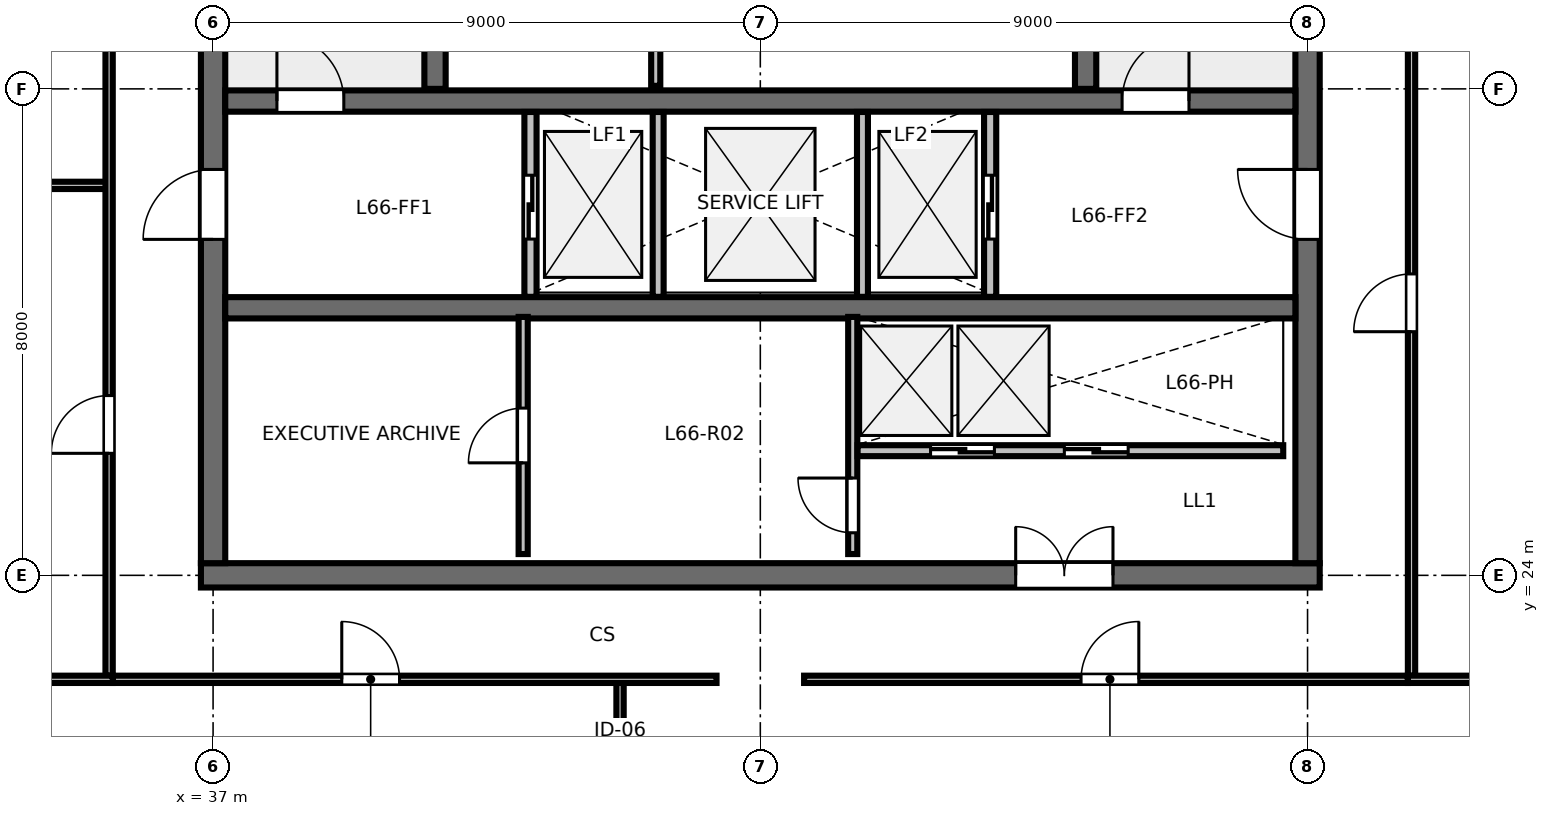
"""IFC4 building model, lengths in metres.
Left out: names, types, materials, properties, quantities, classifications, styles, units other than length and angle.
Written with IfcOpenShell. Run it as: python <this file> out.ifc"""

import sys

from ifc_helpers import new_model, si_unit, direction, frame, frame_2d, origin, place, context, subcontext, project, spatial, rectangle, extrude, element, fill, save


model = new_model("IFC4")
c1 = context("Model", 3, precision=1e-05, world=origin(), true_north=direction((0.0, 1.0)))
c2 = subcontext(c1, "Body", "Model", "MODEL_VIEW")
j1 = project(units=[si_unit("LENGTHUNIT", "METRE"), si_unit("PLANEANGLEUNIT", "RADIAN")], contexts=[c1])
p1 = place(None, origin())
s1 = spatial("IfcSite", under=j1, at=p1, CompositionType="ELEMENT")
p2 = place(p1, origin())
s2 = spatial("IfcBuilding", under=s1, at=p2, CompositionType="ELEMENT")
p3 = place(p2, frame((0.0, 0.0, 250.2)))
s3 = spatial("IfcBuildingStorey", under=s2, at=p3, CompositionType="ELEMENT", Elevation=250.2)
p4 = place(p3, frame((36.8, 24.0, 0.0), z_axis=(0.0, 0.0, 1.0), x_axis=(1.0, 0.0, 0.0)))
e1 = element("IfcWall", 1, at=p4, inside=s3, PredefinedType="SHEAR", context=c2, shape_type="SweptSolid", body=[
    extrude(rectangle(XDim=18.4, YDim=0.4, at=frame_2d((9.2, 0.0))), origin(), (0.0, 0.0, 1.0), 3.36),
])
p5 = place(p4, frame((13.4, 0.0, 0.0)))
e2 = element("IfcOpeningElement", 2, at=p5, cuts=e1, PredefinedType="OPENING", context=c2, shape_type="SweptSolid", body=[
    extrude(rectangle(XDim=1.6, YDim=2.15, at=frame_2d((0.8, 1.075))), frame((0.0, 0.21, 0.0), z_axis=(0.0, -1.0, 0.0), x_axis=(1.0, 0.0, 0.0)), (0.0, 0.0, 1.0), 0.42),
])
p6 = place(p3, frame((37.0, 24.2, 0.0), z_axis=(0.0, 0.0, 1.0), x_axis=(0.0, 1.0, 0.0)))
e3 = element("IfcWall", 3, at=p6, inside=s3, PredefinedType="SHEAR", context=c2, shape_type="SweptSolid", body=[
    extrude(rectangle(XDim=15.6, YDim=0.4, at=frame_2d((7.8, 0.0))), origin(), (0.0, 0.0, 1.0), 3.36),
])
p7 = place(p6, frame((5.325, 0.0, 0.0)))
e4 = element("IfcOpeningElement", 4, at=p7, cuts=e3, PredefinedType="OPENING", context=c2, shape_type="SweptSolid", body=[
    extrude(rectangle(XDim=1.15, YDim=2.15, at=frame_2d((0.575, 1.075))), frame((0.0, 0.21, 0.0), z_axis=(0.0, -1.0, 0.0), x_axis=(1.0, 0.0, 0.0)), (0.0, 0.0, 1.0), 0.42),
])
p8 = place(p3, frame((55.0, 24.2, 0.0), z_axis=(0.0, 0.0, 1.0), x_axis=(0.0, 1.0, 0.0)))
e5 = element("IfcWall", 5, at=p8, inside=s3, PredefinedType="SHEAR", context=c2, shape_type="SweptSolid", body=[
    extrude(rectangle(XDim=15.6, YDim=0.4, at=frame_2d((7.8, 0.0))), origin(), (0.0, 0.0, 1.0), 3.36),
])
p9 = place(p8, frame((5.325, 0.0, 0.0)))
e6 = element("IfcOpeningElement", 6, at=p9, cuts=e5, PredefinedType="OPENING", context=c2, shape_type="SweptSolid", body=[
    extrude(rectangle(XDim=1.15, YDim=2.15, at=frame_2d((0.575, 1.075))), frame((0.0, 0.21, 0.0), z_axis=(0.0, -1.0, 0.0), x_axis=(1.0, 0.0, 0.0)), (0.0, 0.0, 1.0), 0.42),
])
p10 = place(p3, frame((37.2, 31.8, 0.0), z_axis=(0.0, 0.0, 1.0), x_axis=(1.0, 0.0, 0.0)))
e7 = element("IfcWall", 7, at=p10, inside=s3, PredefinedType="SHEAR", context=c2, shape_type="SweptSolid", body=[
    extrude(rectangle(XDim=17.6, YDim=0.35, at=frame_2d((8.8, 0.0))), origin(), (0.0, 0.0, 1.0), 3.36),
])
p11 = place(p10, frame((0.85, 0.0, 0.0)))
e8 = element("IfcOpeningElement", 8, at=p11, cuts=e7, PredefinedType="OPENING", context=c2, shape_type="SweptSolid", body=[
    extrude(rectangle(XDim=1.1, YDim=2.15, at=frame_2d((0.55, 1.075))), frame((0.0, 0.185, 0.0), z_axis=(0.0, -1.0, 0.0), x_axis=(1.0, 0.0, 0.0)), (0.0, 0.0, 1.0), 0.37),
])
p12 = place(p10, frame((14.75, 0.0, 0.0)))
e9 = element("IfcOpeningElement", 9, at=p12, cuts=e7, PredefinedType="OPENING", context=c2, shape_type="SweptSolid", body=[
    extrude(rectangle(XDim=1.1, YDim=2.15, at=frame_2d((0.55, 1.075))), frame((0.0, 0.185, 0.0), z_axis=(0.0, -1.0, 0.0), x_axis=(1.0, 0.0, 0.0)), (0.0, 0.0, 1.0), 0.37),
])
p13 = place(p3, frame((37.2, 28.4, 0.0), z_axis=(0.0, 0.0, 1.0), x_axis=(1.0, 0.0, 0.0)))
e10 = element("IfcWall", 10, at=p13, inside=s3, PredefinedType="SHEAR", context=c2, shape_type="SweptSolid", body=[
    extrude(rectangle(XDim=17.6, YDim=0.35, at=frame_2d((8.8, 0.0))), origin(), (0.0, 0.0, 1.0), 3.36),
])
for number, where, z_axis, x_axis in (
    (11, (57.193, 14.731, 0.0), (0.0, 0.0, 1.0), (0.707, 0.707, 0.0)),
    (12, (27.159, 22.38, 0.0), (0.0, 0.0, 1.0), (0.707, -0.707, 0.0)),
):
    element("IfcWall", number, at=place(p3, frame(where, z_axis=z_axis, x_axis=x_axis)), inside=s3, PredefinedType="STANDARD", context=c2, shape_type="SweptSolid", body=[
        extrude(rectangle(XDim=10.816, YDim=0.265, at=frame_2d((5.408, 0.0))), origin(), (0.0, 0.0, 1.0), 2.832),
    ])
for number, where, z_axis, x_axis in (
    (13, (40.65, 32.0, 0.0), (0.0, 0.0, 1.0), (0.0, 1.0, 0.0)),
    (14, (51.35, 32.0, 0.0), (0.0, 0.0, 1.0), (0.0, 1.0, 0.0)),
):
    element("IfcWall", number, at=place(p3, frame(where, z_axis=z_axis, x_axis=x_axis)), inside=s3, PredefinedType="SHEAR", context=c2, shape_type="SweptSolid", body=[
        extrude(rectangle(XDim=7.7, YDim=0.35, at=frame_2d((3.85, 0.0))), origin(), (0.0, 0.0, 1.0), 3.6),
    ])
p14 = place(p3, frame((44.28, 32.05, 0.0), z_axis=(0.0, 0.0, 1.0), x_axis=(0.0, 1.0, 0.0)))
e15 = element("IfcWall", 15, at=p14, inside=s3, PredefinedType="PARTITIONING", context=c2, shape_type="SweptSolid", body=[
    extrude(rectangle(XDim=3.67, YDim=0.15, at=frame_2d((1.835, 0.0))), origin(), (0.0, 0.0, 1.0), 3.375),
])
p15 = place(p14, frame((1.35, 0.0, 0.0)))
e16 = element("IfcOpeningElement", 16, at=p15, cuts=e15, PredefinedType="OPENING", context=c2, shape_type="SweptSolid", body=[
    extrude(rectangle(XDim=0.92, YDim=2.15, at=frame_2d((0.46, 1.075))), frame((0.0, 0.085, 0.0), z_axis=(0.0, -1.0, 0.0), x_axis=(1.0, 0.0, 0.0)), (0.0, 0.0, 1.0), 0.17),
])
p16 = place(p3, frame((42.22, 28.58, 0.0), z_axis=(0.0, 0.0, 1.0), x_axis=(0.0, 1.0, 0.0)))
e17 = element("IfcWall", 17, at=p16, inside=s3, PredefinedType="PARTITIONING", context=c2, shape_type="SweptSolid", body=[
    extrude(rectangle(XDim=3.04, YDim=0.2, at=frame_2d((1.52, 0.0))), origin(), (0.0, 0.0, 1.0), 3.375),
])
p17 = place(p16, frame((0.95, 0.0, 0.0)))
e18 = element("IfcOpeningElement", 18, at=p17, cuts=e17, PredefinedType="OPENING", context=c2, shape_type="SweptSolid", body=[
    extrude(rectangle(XDim=1.05, YDim=2.15, at=frame_2d((0.525, 1.075))), frame((0.0, 0.11, 0.0), z_axis=(0.0, -1.0, 0.0), x_axis=(1.0, 0.0, 0.0)), (0.0, 0.0, 1.0), 0.22),
])
p18 = place(p3, frame((49.78, 28.58, 0.0), z_axis=(0.0, 0.0, 1.0), x_axis=(0.0, 1.0, 0.0)))
e19 = element("IfcWall", 19, at=p18, inside=s3, PredefinedType="PARTITIONING", context=c2, shape_type="SweptSolid", body=[
    extrude(rectangle(XDim=3.04, YDim=0.2, at=frame_2d((1.52, 0.0))), origin(), (0.0, 0.0, 1.0), 3.375),
])
p19 = place(p18, frame((0.95, 0.0, 0.0)))
e20 = element("IfcOpeningElement", 20, at=p19, cuts=e19, PredefinedType="OPENING", context=c2, shape_type="SweptSolid", body=[
    extrude(rectangle(XDim=1.05, YDim=2.15, at=frame_2d((0.525, 1.075))), frame((0.0, 0.11, 0.0), z_axis=(0.0, -1.0, 0.0), x_axis=(1.0, 0.0, 0.0)), (0.0, 0.0, 1.0), 0.22),
])
for number, where, z_axis, x_axis in (
    (21, (44.32, 28.58, 0.0), (0.0, 0.0, 1.0), (0.0, 1.0, 0.0)),
    (22, (47.68, 28.58, 0.0), (0.0, 0.0, 1.0), (0.0, 1.0, 0.0)),
):
    element("IfcWall", number, at=place(p3, frame(where, z_axis=z_axis, x_axis=x_axis)), inside=s3, PredefinedType="PARTITIONING", context=c2, shape_type="SweptSolid", body=[
        extrude(rectangle(XDim=3.04, YDim=0.18, at=frame_2d((1.52, 0.0))), origin(), (0.0, 0.0, 1.0), 3.375),
    ])
p20 = place(p3, frame((42.1, 24.35, 0.0), z_axis=(0.0, 0.0, 1.0), x_axis=(0.0, 1.0, 0.0)))
e23 = element("IfcWall", 23, at=p20, inside=s3, PredefinedType="PARTITIONING", context=c2, shape_type="SweptSolid", body=[
    extrude(rectangle(XDim=3.9, YDim=0.15, at=frame_2d((1.95, 0.0))), origin(), (0.0, 0.0, 1.0), 3.375),
])
p21 = place(p20, frame((1.5, 0.0, 0.0)))
e24 = element("IfcOpeningElement", 24, at=p21, cuts=e23, PredefinedType="OPENING", context=c2, shape_type="SweptSolid", body=[
    extrude(rectangle(XDim=0.9, YDim=2.15, at=frame_2d((0.45, 1.075))), frame((0.0, 0.085, 0.0), z_axis=(0.0, -1.0, 0.0), x_axis=(1.0, 0.0, 0.0)), (0.0, 0.0, 1.0), 0.17),
])
p22 = place(p3, frame((47.52, 24.35, 0.0), z_axis=(0.0, 0.0, 1.0), x_axis=(0.0, 1.0, 0.0)))
e25 = element("IfcWall", 25, at=p22, inside=s3, PredefinedType="PARTITIONING", context=c2, shape_type="SweptSolid", body=[
    extrude(rectangle(XDim=3.9, YDim=0.15, at=frame_2d((1.95, 0.0))), origin(), (0.0, 0.0, 1.0), 3.375),
])
p23 = place(p22, frame((0.35, 0.0, 0.0)))
e26 = element("IfcOpeningElement", 26, at=p23, cuts=e25, PredefinedType="OPENING", context=c2, shape_type="SweptSolid", body=[
    extrude(rectangle(XDim=0.9, YDim=2.15, at=frame_2d((0.45, 1.075))), frame((0.0, 0.085, 0.0), z_axis=(0.0, -1.0, 0.0), x_axis=(1.0, 0.0, 0.0)), (0.0, 0.0, 1.0), 0.17),
])
p24 = place(p3, frame((47.6, 26.05, 0.0), z_axis=(0.0, 0.0, 1.0), x_axis=(1.0, 0.0, 0.0)))
e27 = element("IfcWall", 27, at=p24, inside=s3, PredefinedType="PARTITIONING", context=c2, shape_type="SweptSolid", body=[
    extrude(rectangle(XDim=7.0, YDim=0.18, at=frame_2d((3.5, 0.0))), origin(), (0.0, 0.0, 1.0), 3.375),
])
p25 = place(p24, frame((1.2, 0.0, 0.0)))
e28 = element("IfcOpeningElement", 28, at=p25, cuts=e27, PredefinedType="OPENING", context=c2, shape_type="SweptSolid", body=[
    extrude(rectangle(XDim=1.05, YDim=2.15, at=frame_2d((0.525, 1.075))), frame((0.0, 0.1, 0.0), z_axis=(0.0, -1.0, 0.0), x_axis=(1.0, 0.0, 0.0)), (0.0, 0.0, 1.0), 0.2),
])
p26 = place(p24, frame((3.4, 0.0, 0.0)))
e29 = element("IfcOpeningElement", 29, at=p26, cuts=e27, PredefinedType="OPENING", context=c2, shape_type="SweptSolid", body=[
    extrude(rectangle(XDim=1.05, YDim=2.15, at=frame_2d((0.525, 1.075))), frame((0.0, 0.1, 0.0), z_axis=(0.0, -1.0, 0.0), x_axis=(1.0, 0.0, 0.0)), (0.0, 0.0, 1.0), 0.2),
])
p27 = place(p3, frame((43.693, 22.29, 0.0), z_axis=(0.0, 0.0, 1.0), x_axis=(0.0, -1.0, 0.0)))
e30 = element("IfcWall", 30, at=p27, inside=s3, PredefinedType="PARTITIONING", context=c2, shape_type="SweptSolid", body=[
    extrude(rectangle(XDim=7.114, YDim=0.12, at=frame_2d((3.557, 0.0))), origin(), (0.0, 0.0, 1.0), 2.655),
])
p28 = place(p27, frame((1.4, 0.0, 0.0)))
e31 = element("IfcOpeningElement", 31, at=p28, cuts=e30, PredefinedType="OPENING", context=c2, shape_type="SweptSolid", body=[
    extrude(rectangle(XDim=0.9, YDim=2.15, at=frame_2d((0.45, 1.075))), frame((0.0, 0.07, 0.0), z_axis=(0.0, -1.0, 0.0), x_axis=(1.0, 0.0, 0.0)), (0.0, 0.0, 1.0), 0.14),
])
p29 = place(p3, frame((35.35, 22.29, 0.0), z_axis=(0.0, 0.0, 1.0), x_axis=(1.0, 0.0, 0.0)))
e32 = element("IfcWall", 32, at=p29, inside=s3, PredefinedType="PARTITIONING", context=c2, shape_type="SweptSolid", body=[
    extrude(rectangle(XDim=9.93, YDim=0.12, at=frame_2d((4.965, 0.0))), origin(), (0.0, 0.0, 1.0), 2.655),
])
p30 = place(p29, frame((3.767, 0.0, 0.0)))
e33 = element("IfcOpeningElement", 33, at=p30, cuts=e32, PredefinedType="OPENING", context=c2, shape_type="SweptSolid", body=[
    extrude(rectangle(XDim=0.95, YDim=2.15, at=frame_2d((0.475, 1.075))), frame((0.0, 0.07, 0.0), z_axis=(0.0, -1.0, 0.0), x_axis=(1.0, 0.0, 0.0)), (0.0, 0.0, 1.0), 0.14),
])
p31 = place(p3, frame((46.72, 22.29, 0.0), z_axis=(0.0, 0.0, 1.0), x_axis=(1.0, 0.0, 0.0)))
e34 = element("IfcWall", 34, at=p31, inside=s3, PredefinedType="PARTITIONING", context=c2, shape_type="SweptSolid", body=[
    extrude(rectangle(XDim=9.93, YDim=0.12, at=frame_2d((4.965, 0.0))), origin(), (0.0, 0.0, 1.0), 2.655),
])
p32 = place(p31, frame((4.555, 0.0, 0.0)))
e35 = element("IfcOpeningElement", 35, at=p32, cuts=e34, PredefinedType="OPENING", context=c2, shape_type="SweptSolid", body=[
    extrude(rectangle(XDim=0.95, YDim=2.15, at=frame_2d((0.475, 1.075))), frame((0.0, 0.07, 0.0), z_axis=(0.0, -1.0, 0.0), x_axis=(1.0, 0.0, 0.0)), (0.0, 0.0, 1.0), 0.14),
])
p33 = place(p3, frame((35.29, 30.413, 0.0), z_axis=(0.0, 0.0, 1.0), x_axis=(-1.0, 0.0, 0.0)))
e36 = element("IfcWall", 36, at=p33, inside=s3, PredefinedType="PARTITIONING", context=c2, shape_type="SweptSolid", body=[
    extrude(rectangle(XDim=7.687, YDim=0.12, at=frame_2d((3.843, 0.0))), origin(), (0.0, 0.0, 1.0), 2.655),
])
p34 = place(p33, frame((1.4, 0.0, 0.0)))
e37 = element("IfcOpeningElement", 37, at=p34, cuts=e36, PredefinedType="OPENING", context=c2, shape_type="SweptSolid", body=[
    extrude(rectangle(XDim=0.9, YDim=2.15, at=frame_2d((0.45, 1.075))), frame((0.0, 0.07, 0.0), z_axis=(0.0, -1.0, 0.0), x_axis=(1.0, 0.0, 0.0)), (0.0, 0.0, 1.0), 0.14),
])
p35 = place(p3, frame((35.29, 22.35, 0.0), z_axis=(0.0, 0.0, 1.0), x_axis=(0.0, 1.0, 0.0)))
e38 = element("IfcWall", 38, at=p35, inside=s3, PredefinedType="PARTITIONING", context=c2, shape_type="SweptSolid", body=[
    extrude(rectangle(XDim=19.3, YDim=0.12, at=frame_2d((9.65, 0.0))), origin(), (0.0, 0.0, 1.0), 2.655),
])
p36 = place(p35, frame((3.656, 0.0, 0.0)))
e39 = element("IfcOpeningElement", 39, at=p36, cuts=e38, PredefinedType="OPENING", context=c2, shape_type="SweptSolid", body=[
    extrude(rectangle(XDim=0.95, YDim=2.15, at=frame_2d((0.475, 1.075))), frame((0.0, 0.07, 0.0), z_axis=(0.0, -1.0, 0.0), x_axis=(1.0, 0.0, 0.0)), (0.0, 0.0, 1.0), 0.14),
])
p37 = place(p35, frame((13.106, 0.0, 0.0)))
e40 = element("IfcOpeningElement", 40, at=p37, cuts=e38, PredefinedType="OPENING", context=c2, shape_type="SweptSolid", body=[
    extrude(rectangle(XDim=0.95, YDim=2.15, at=frame_2d((0.475, 1.075))), frame((0.0, 0.07, 0.0), z_axis=(0.0, -1.0, 0.0), x_axis=(1.0, 0.0, 0.0)), (0.0, 0.0, 1.0), 0.14),
])
p38 = place(p3, frame((56.71, 22.35, 0.0), z_axis=(0.0, 0.0, 1.0), x_axis=(0.0, 1.0, 0.0)))
e41 = element("IfcWall", 41, at=p38, inside=s3, PredefinedType="PARTITIONING", context=c2, shape_type="SweptSolid", body=[
    extrude(rectangle(XDim=19.3, YDim=0.12, at=frame_2d((9.65, 0.0))), origin(), (0.0, 0.0, 1.0), 2.655),
])
p39 = place(p38, frame((5.657, 0.0, 0.0)))
e42 = element("IfcOpeningElement", 42, at=p39, cuts=e41, PredefinedType="OPENING", context=c2, shape_type="SweptSolid", body=[
    extrude(rectangle(XDim=0.95, YDim=2.15, at=frame_2d((0.475, 1.075))), frame((0.0, 0.07, 0.0), z_axis=(0.0, -1.0, 0.0), x_axis=(1.0, 0.0, 0.0)), (0.0, 0.0, 1.0), 0.14),
])
p40 = place(p38, frame((15.107, 0.0, 0.0)))
e43 = element("IfcOpeningElement", 43, at=p40, cuts=e41, PredefinedType="OPENING", context=c2, shape_type="SweptSolid", body=[
    extrude(rectangle(XDim=0.95, YDim=2.15, at=frame_2d((0.475, 1.075))), frame((0.0, 0.07, 0.0), z_axis=(0.0, -1.0, 0.0), x_axis=(1.0, 0.0, 0.0)), (0.0, 0.0, 1.0), 0.14),
])
for number, where, z_axis, x_axis in (
    (44, (35.35, 22.29, 0.0), (0.0, 0.0, 1.0), (-1.0, 0.0, 0.0)),
    (45, (56.65, 22.29, 0.0), (0.0, 0.0, 1.0), (1.0, 0.0, 0.0)),
):
    element("IfcWall", number, at=place(p3, frame(where, z_axis=z_axis, x_axis=x_axis)), inside=s3, PredefinedType="PARTITIONING", context=c2, shape_type="SweptSolid", body=[
        extrude(rectangle(XDim=7.747, YDim=0.12, at=frame_2d((3.873, 0.0))), origin(), (0.0, 0.0, 1.0), 2.655),
    ])
p41 = place(p11, origin())
e46 = element("IfcDoor", 46, at=p41, inside=s3, OperationType="SINGLE_SWING_LEFT", PredefinedType="DOOR", context=c2, shape_type="SweptSolid", body=[
    extrude(rectangle(XDim=1.1, YDim=2.15, at=frame_2d((0.55, 1.075))), frame((0.0, 0.025, 0.0), z_axis=(0.0, -1.0, 0.0), x_axis=(1.0, 0.0, 0.0)), (0.0, 0.0, 1.0), 0.05),
])
fill(e8, e46)
p42 = place(p12, origin())
e47 = element("IfcDoor", 47, at=p42, inside=s3, OperationType="SINGLE_SWING_RIGHT", PredefinedType="DOOR", context=c2, shape_type="SweptSolid", body=[
    extrude(rectangle(XDim=1.1, YDim=2.15, at=frame_2d((0.55, 1.075))), frame((0.0, 0.025, 0.0), z_axis=(0.0, -1.0, 0.0), x_axis=(1.0, 0.0, 0.0)), (0.0, 0.0, 1.0), 0.05),
])
fill(e9, e47)
p43 = place(p7, origin())
e48 = element("IfcDoor", 48, at=p43, inside=s3, OperationType="SINGLE_SWING_LEFT", PredefinedType="DOOR", context=c2, shape_type="SweptSolid", body=[
    extrude(rectangle(XDim=1.15, YDim=2.15, at=frame_2d((0.575, 1.075))), frame((0.0, 0.025, 0.0), z_axis=(0.0, -1.0, 0.0), x_axis=(1.0, 0.0, 0.0)), (0.0, 0.0, 1.0), 0.05),
])
fill(e4, e48)
p44 = place(p9, origin())
e49 = element("IfcDoor", 49, at=p44, inside=s3, OperationType="SINGLE_SWING_RIGHT", PredefinedType="DOOR", context=c2, shape_type="SweptSolid", body=[
    extrude(rectangle(XDim=1.15, YDim=2.15, at=frame_2d((0.575, 1.075))), frame((0.0, 0.025, 0.0), z_axis=(0.0, -1.0, 0.0), x_axis=(1.0, 0.0, 0.0)), (0.0, 0.0, 1.0), 0.05),
])
fill(e6, e49)
p45 = place(p5, origin())
e50 = element("IfcDoor", 50, at=p45, inside=s3, OperationType="DOUBLE_DOOR_SINGLE_SWING", PredefinedType="DOOR", context=c2, shape_type="SweptSolid", body=[
    extrude(rectangle(XDim=1.6, YDim=2.15, at=frame_2d((0.8, 1.075))), frame((0.0, 0.025, 0.0), z_axis=(0.0, -1.0, 0.0), x_axis=(1.0, 0.0, 0.0)), (0.0, 0.0, 1.0), 0.05),
])
fill(e2, e50)
p46 = place(p17, origin())
e51 = element("IfcDoor", 51, at=p46, inside=s3, OperationType="SLIDING_TO_LEFT", PredefinedType="DOOR", context=c2, shape_type="SweptSolid", body=[
    extrude(rectangle(XDim=1.05, YDim=2.15, at=frame_2d((0.525, 1.075))), frame((0.0, 0.025, 0.0), z_axis=(0.0, -1.0, 0.0), x_axis=(1.0, 0.0, 0.0)), (0.0, 0.0, 1.0), 0.05),
])
fill(e18, e51)
p47 = place(p19, origin())
e52 = element("IfcDoor", 52, at=p47, inside=s3, OperationType="SLIDING_TO_RIGHT", PredefinedType="DOOR", context=c2, shape_type="SweptSolid", body=[
    extrude(rectangle(XDim=1.05, YDim=2.15, at=frame_2d((0.525, 1.075))), frame((0.0, 0.025, 0.0), z_axis=(0.0, -1.0, 0.0), x_axis=(1.0, 0.0, 0.0)), (0.0, 0.0, 1.0), 0.05),
])
fill(e20, e52)
p48 = place(p21, origin())
e53 = element("IfcDoor", 53, at=p48, inside=s3, OperationType="SINGLE_SWING_LEFT", PredefinedType="DOOR", context=c2, shape_type="SweptSolid", body=[
    extrude(rectangle(XDim=0.9, YDim=2.15, at=frame_2d((0.45, 1.075))), frame((0.0, 0.025, 0.0), z_axis=(0.0, -1.0, 0.0), x_axis=(1.0, 0.0, 0.0)), (0.0, 0.0, 1.0), 0.05),
])
fill(e24, e53)
p49 = place(p23, origin())
e54 = element("IfcDoor", 54, at=p49, inside=s3, OperationType="SINGLE_SWING_RIGHT", PredefinedType="DOOR", context=c2, shape_type="SweptSolid", body=[
    extrude(rectangle(XDim=0.9, YDim=2.15, at=frame_2d((0.45, 1.075))), frame((0.0, 0.025, 0.0), z_axis=(0.0, -1.0, 0.0), x_axis=(1.0, 0.0, 0.0)), (0.0, 0.0, 1.0), 0.05),
])
fill(e26, e54)
p50 = place(p25, origin())
e55 = element("IfcDoor", 55, at=p50, inside=s3, OperationType="SLIDING_TO_LEFT", PredefinedType="DOOR", context=c2, shape_type="SweptSolid", body=[
    extrude(rectangle(XDim=1.05, YDim=2.15, at=frame_2d((0.525, 1.075))), frame((0.0, 0.025, 0.0), z_axis=(0.0, -1.0, 0.0), x_axis=(1.0, 0.0, 0.0)), (0.0, 0.0, 1.0), 0.05),
])
fill(e28, e55)
p51 = place(p26, origin())
e56 = element("IfcDoor", 56, at=p51, inside=s3, OperationType="SLIDING_TO_RIGHT", PredefinedType="DOOR", context=c2, shape_type="SweptSolid", body=[
    extrude(rectangle(XDim=1.05, YDim=2.15, at=frame_2d((0.525, 1.075))), frame((0.0, 0.025, 0.0), z_axis=(0.0, -1.0, 0.0), x_axis=(1.0, 0.0, 0.0)), (0.0, 0.0, 1.0), 0.05),
])
fill(e29, e56)
p52 = place(p30, origin())
e57 = element("IfcDoor", 57, at=p52, inside=s3, OperationType="SINGLE_SWING_LEFT", PredefinedType="DOOR", context=c2, shape_type="SweptSolid", body=[
    extrude(rectangle(XDim=0.95, YDim=2.15, at=frame_2d((0.475, 1.075))), frame((0.0, 0.025, 0.0), z_axis=(0.0, -1.0, 0.0), x_axis=(1.0, 0.0, 0.0)), (0.0, 0.0, 1.0), 0.05),
])
fill(e33, e57)
p53 = place(p32, origin())
e58 = element("IfcDoor", 58, at=p53, inside=s3, OperationType="SINGLE_SWING_RIGHT", PredefinedType="DOOR", context=c2, shape_type="SweptSolid", body=[
    extrude(rectangle(XDim=0.95, YDim=2.15, at=frame_2d((0.475, 1.075))), frame((0.0, 0.025, 0.0), z_axis=(0.0, -1.0, 0.0), x_axis=(1.0, 0.0, 0.0)), (0.0, 0.0, 1.0), 0.05),
])
fill(e35, e58)
p54 = place(p36, origin())
e59 = element("IfcDoor", 59, at=p54, inside=s3, OperationType="SINGLE_SWING_LEFT", PredefinedType="DOOR", context=c2, shape_type="SweptSolid", body=[
    extrude(rectangle(XDim=0.95, YDim=2.15, at=frame_2d((0.475, 1.075))), frame((0.0, 0.025, 0.0), z_axis=(0.0, -1.0, 0.0), x_axis=(1.0, 0.0, 0.0)), (0.0, 0.0, 1.0), 0.05),
])
fill(e39, e59)
p55 = place(p39, origin())
e60 = element("IfcDoor", 60, at=p55, inside=s3, OperationType="SINGLE_SWING_LEFT", PredefinedType="DOOR", context=c2, shape_type="SweptSolid", body=[
    extrude(rectangle(XDim=0.95, YDim=2.15, at=frame_2d((0.475, 1.075))), frame((0.0, 0.025, 0.0), z_axis=(0.0, -1.0, 0.0), x_axis=(1.0, 0.0, 0.0)), (0.0, 0.0, 1.0), 0.05),
])
fill(e42, e60)
save(model, sys.argv[1])
